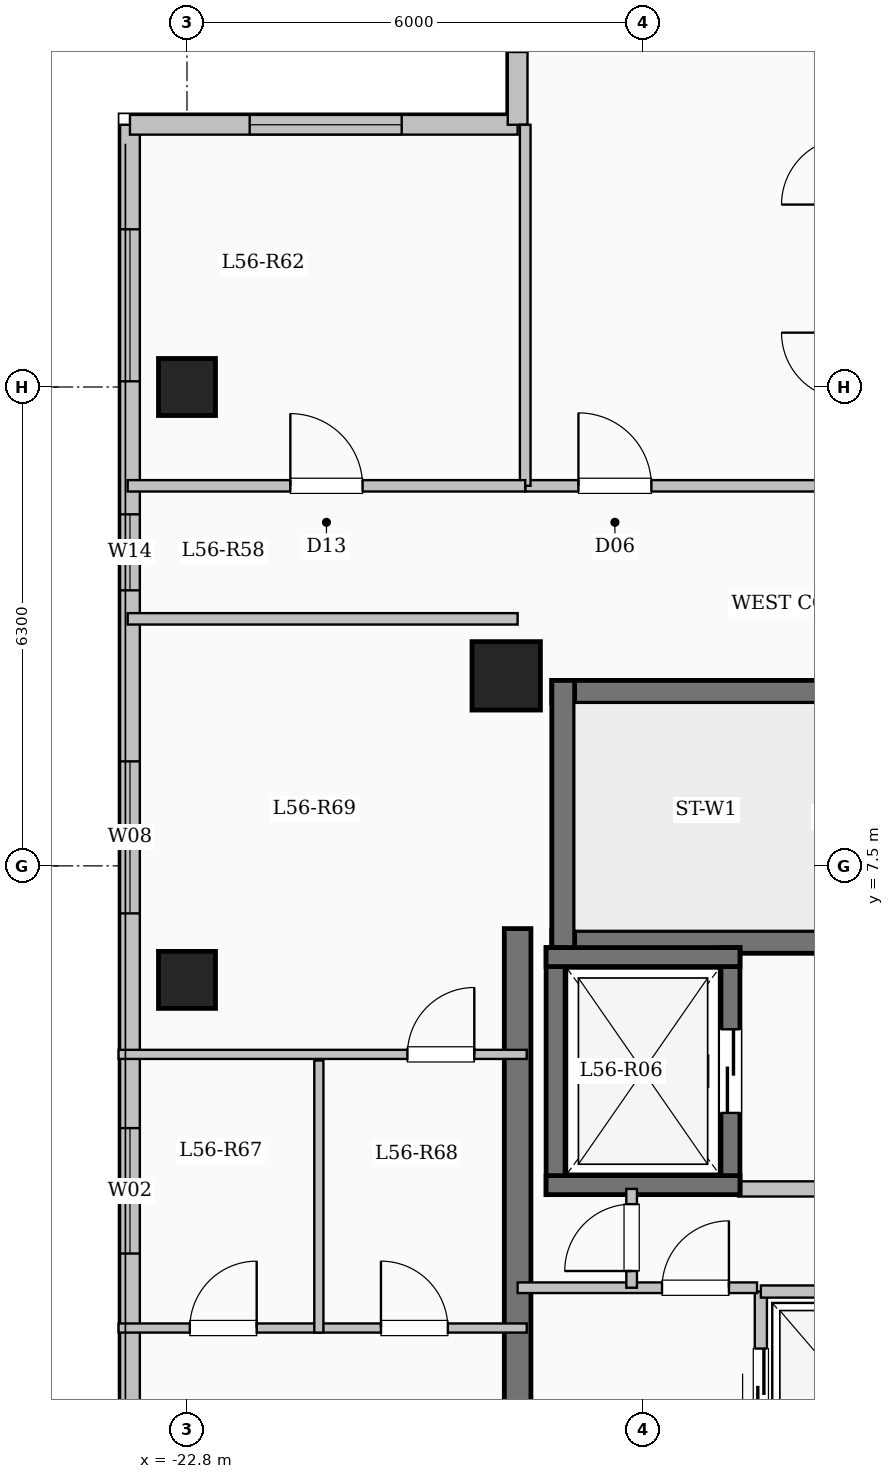
"""IFC4 building model, lengths in metres.
Left out: names, types, materials, properties, quantities, classifications, styles, units other than length and angle.
Written with IfcOpenShell. Run it as: python <this file> out.ifc"""

import sys

from ifc_helpers import new_model, si_unit, direction, frame, frame_2d, origin, origin_2d, place, context, subcontext, project, spatial, rectangle, extrude, element, fill, save


model = new_model("IFC4")
c1 = context("Model", 3, precision=1e-05, world=origin(), true_north=direction((0.0, 1.0)))
c2 = subcontext(c1, "Body", "Model", "MODEL_VIEW")
j1 = project(units=[si_unit("LENGTHUNIT", "METRE"), si_unit("PLANEANGLEUNIT", "RADIAN")], contexts=[c1])
p1 = place(None, origin())
s1 = spatial("IfcSite", under=j1, at=p1, CompositionType="ELEMENT")
p2 = place(p1, origin())
s2 = spatial("IfcBuilding", under=s1, at=p2, CompositionType="ELEMENT")
p3 = place(p2, frame((0.0, 0.0, 207.0)))
s3 = spatial("IfcBuildingStorey", under=s2, at=p3, CompositionType="ELEMENT", Elevation=207.0)
p4 = place(p3, frame((-18.6, 10.0, 0.0), z_axis=(0.0, 0.0, 1.0), x_axis=(1.0, 0.0, 0.0)))
e1 = element("IfcColumn", 1, at=p4, inside=s3, PredefinedType="COLUMN", context=c2, shape_type="SweptSolid", body=[
    extrude(rectangle(XDim=0.9, YDim=0.9, at=origin_2d()), origin(), (0.0, 0.0, 1.0), 3.35),
])
for number, where, z_axis, x_axis in (
    (2, (-22.8, 6.0, 0.0), (0.0, 0.0, 1.0), (1.0, 0.0, 0.0)),
    (3, (-22.8, 13.8, 0.0), (0.0, 0.0, 1.0), (1.0, 0.0, 0.0)),
):
    element("IfcColumn", number, at=place(p3, frame(where, z_axis=z_axis, x_axis=x_axis)), inside=s3, PredefinedType="COLUMN", context=c2, shape_type="SweptSolid", body=[
        extrude(rectangle(XDim=0.75, YDim=0.75, at=origin_2d()), origin(), (0.0, 0.0, 1.0), 3.35),
    ])
p5 = place(p3, frame((-23.55, -17.25, 0.0), z_axis=(0.0, 0.0, 1.0), x_axis=(0.0, 1.0, 0.0)))
e4 = element("IfcWall", 4, at=p5, inside=s3, PredefinedType="SOLIDWALL", context=c2, shape_type="SweptSolid", body=[
    extrude(rectangle(XDim=34.5, YDim=0.26, at=frame_2d((17.25, 0.0))), origin(), (0.0, 0.0, 1.0), 3.1),
])
p6 = place(p5, frame((2.825, 0.0, 0.9)))
e5 = element("IfcOpeningElement", 5, at=p6, cuts=e4, PredefinedType="OPENING", context=c2, shape_type="SweptSolid", body=[
    extrude(rectangle(XDim=2.2, YDim=1.75, at=frame_2d((1.1, 0.875))), frame((0.0, 0.14, 0.0), z_axis=(0.0, -1.0, 0.0), x_axis=(1.0, 0.0, 0.0)), (0.0, 0.0, 1.0), 0.28),
])
p7 = place(p5, frame((8.325, 0.0, 0.95)))
e6 = element("IfcOpeningElement", 6, at=p7, cuts=e4, PredefinedType="OPENING", context=c2, shape_type="SweptSolid", body=[
    extrude(rectangle(XDim=1.2, YDim=1.5, at=frame_2d((0.6, 0.75))), frame((0.0, 0.14, 0.0), z_axis=(0.0, -1.0, 0.0), x_axis=(1.0, 0.0, 0.0)), (0.0, 0.0, 1.0), 0.28),
])
p8 = place(p5, frame((13.25, 0.0, 0.9)))
e7 = element("IfcOpeningElement", 7, at=p8, cuts=e4, PredefinedType="OPENING", context=c2, shape_type="SweptSolid", body=[
    extrude(rectangle(XDim=2.2, YDim=1.75, at=frame_2d((1.1, 0.875))), frame((0.0, 0.14, 0.0), z_axis=(0.0, -1.0, 0.0), x_axis=(1.0, 0.0, 0.0)), (0.0, 0.0, 1.0), 0.28),
])
p9 = place(p5, frame((19.65, 0.0, 0.9)))
e8 = element("IfcOpeningElement", 8, at=p9, cuts=e4, PredefinedType="OPENING", context=c2, shape_type="SweptSolid", body=[
    extrude(rectangle(XDim=1.65, YDim=1.6, at=frame_2d((0.825, 0.8))), frame((0.0, 0.14, 0.0), z_axis=(0.0, -1.0, 0.0), x_axis=(1.0, 0.0, 0.0)), (0.0, 0.0, 1.0), 0.28),
])
p10 = place(p5, frame((24.125, 0.0, 0.9)))
e9 = element("IfcOpeningElement", 9, at=p10, cuts=e4, PredefinedType="OPENING", context=c2, shape_type="SweptSolid", body=[
    extrude(rectangle(XDim=2.0, YDim=1.7, at=frame_2d((1.0, 0.85))), frame((0.0, 0.14, 0.0), z_axis=(0.0, -1.0, 0.0), x_axis=(1.0, 0.0, 0.0)), (0.0, 0.0, 1.0), 0.28),
])
p11 = place(p5, frame((28.375, 0.0, 0.95)))
e10 = element("IfcOpeningElement", 10, at=p11, cuts=e4, PredefinedType="OPENING", context=c2, shape_type="SweptSolid", body=[
    extrude(rectangle(XDim=1.0, YDim=1.5, at=frame_2d((0.5, 0.75))), frame((0.0, 0.14, 0.0), z_axis=(0.0, -1.0, 0.0), x_axis=(1.0, 0.0, 0.0)), (0.0, 0.0, 1.0), 0.28),
])
p12 = place(p5, frame((31.125, 0.0, 0.9)))
e11 = element("IfcOpeningElement", 11, at=p12, cuts=e4, PredefinedType="OPENING", context=c2, shape_type="SweptSolid", body=[
    extrude(rectangle(XDim=2.0, YDim=1.7, at=frame_2d((1.0, 0.85))), frame((0.0, 0.14, 0.0), z_axis=(0.0, -1.0, 0.0), x_axis=(1.0, 0.0, 0.0)), (0.0, 0.0, 1.0), 0.28),
])
p13 = place(p3, frame((-23.55, 17.25, 0.0), z_axis=(0.0, 0.0, 1.0), x_axis=(1.0, 0.0, 0.0)))
e12 = element("IfcWall", 12, at=p13, inside=s3, PredefinedType="SOLIDWALL", context=c2, shape_type="SweptSolid", body=[
    extrude(rectangle(XDim=5.1, YDim=0.26, at=frame_2d((2.55, 0.0))), origin(), (0.0, 0.0, 1.0), 3.1),
])
p14 = place(p13, frame((1.575, 0.0, 0.9)))
e13 = element("IfcOpeningElement", 13, at=p14, cuts=e12, PredefinedType="OPENING", context=c2, shape_type="SweptSolid", body=[
    extrude(rectangle(XDim=2.0, YDim=1.7, at=frame_2d((1.0, 0.85))), frame((0.0, 0.14, 0.0), z_axis=(0.0, -1.0, 0.0), x_axis=(1.0, 0.0, 0.0)), (0.0, 0.0, 1.0), 0.28),
])
p15 = place(p3, frame((-18.45, 17.25, 0.0), z_axis=(0.0, 0.0, 1.0), x_axis=(0.0, 1.0, 0.0)))
e14 = element("IfcWall", 14, at=p15, inside=s3, PredefinedType="SOLIDWALL", context=c2, shape_type="SweptSolid", body=[
    extrude(rectangle(XDim=3.6, YDim=0.26, at=frame_2d((1.8, 0.0))), origin(), (0.0, 0.0, 1.0), 3.1),
])
p16 = place(p15, frame((0.958, 0.0, 0.9)))
e15 = element("IfcOpeningElement", 15, at=p16, cuts=e14, PredefinedType="OPENING", context=c2, shape_type="SweptSolid", body=[
    extrude(rectangle(XDim=1.65, YDim=1.6, at=frame_2d((0.825, 0.8))), frame((0.0, 0.14, 0.0), z_axis=(0.0, -1.0, 0.0), x_axis=(1.0, 0.0, 0.0)), (0.0, 0.0, 1.0), 0.28),
])
p17 = place(p3, frame((-18.0, 9.79, 0.0), z_axis=(0.0, 0.0, 1.0), x_axis=(1.0, 0.0, 0.0)))
e16 = element("IfcWall", 16, at=p17, inside=s3, PredefinedType="SHEAR", context=c2, shape_type="SweptSolid", body=[
    extrude(rectangle(XDim=8.0, YDim=0.3, at=frame_2d((4.0, 0.0))), origin(), (0.0, 0.0, 1.0), 3.35),
])
p18 = place(p3, frame((-18.0, 6.5, 0.0), z_axis=(0.0, 0.0, 1.0), x_axis=(1.0, 0.0, 0.0)))
e17 = element("IfcWall", 17, at=p18, inside=s3, PredefinedType="SHEAR", context=c2, shape_type="SweptSolid", body=[
    extrude(rectangle(XDim=8.0, YDim=0.3, at=frame_2d((4.0, 0.0))), origin(), (0.0, 0.0, 1.0), 3.35),
])
p19 = place(p18, frame((6.45, 0.0, 0.0)))
e18 = element("IfcOpeningElement", 18, at=p19, cuts=e17, PredefinedType="OPENING", context=c2, shape_type="SweptSolid", body=[
    extrude(rectangle(XDim=1.0, YDim=2.15, at=frame_2d((0.5, 1.075))), frame((0.0, 0.16, 0.0), z_axis=(0.0, -1.0, 0.0), x_axis=(1.0, 0.0, 0.0)), (0.0, 0.0, 1.0), 0.32),
])
p20 = place(p3, frame((-17.85, 6.35, 0.0), z_axis=(0.0, 0.0, 1.0), x_axis=(0.0, 1.0, 0.0)))
e19 = element("IfcWall", 19, at=p20, inside=s3, PredefinedType="SHEAR", context=c2, shape_type="SweptSolid", body=[
    extrude(rectangle(XDim=3.59, YDim=0.3, at=frame_2d((1.795, 0.0))), origin(), (0.0, 0.0, 1.0), 3.35),
])
p21 = place(p3, frame((-15.55, 3.25, 0.0), z_axis=(0.0, 0.0, 1.0), x_axis=(1.0, 0.0, 0.0)))
e20 = element("IfcWall", 20, at=p21, inside=s3, PredefinedType="SOLIDWALL", context=c2, shape_type="SweptSolid", body=[
    extrude(rectangle(XDim=5.4, YDim=0.2, at=frame_2d((2.7, 0.0))), origin(), (0.0, 0.0, 1.0), 3.1),
])
p22 = place(p3, frame((-17.95, 3.175, 0.0), z_axis=(0.0, 0.0, 1.0), x_axis=(0.0, 1.0, 0.0)))
e21 = element("IfcWall", 21, at=p22, inside=s3, PredefinedType="SHEAR", context=c2, shape_type="SweptSolid", body=[
    extrude(rectangle(XDim=3.25, YDim=0.25, at=frame_2d((1.625, 0.0))), origin(), (0.0, 0.0, 1.0), 3.35),
])
p23 = place(p3, frame((-15.65, 3.175, 0.0), z_axis=(0.0, 0.0, 1.0), x_axis=(0.0, 1.0, 0.0)))
e22 = element("IfcWall", 22, at=p23, inside=s3, PredefinedType="SHEAR", context=c2, shape_type="SweptSolid", body=[
    extrude(rectangle(XDim=3.25, YDim=0.25, at=frame_2d((1.625, 0.0))), origin(), (0.0, 0.0, 1.0), 3.35),
])
p24 = place(p23, frame((1.075, 0.0, 0.0)))
e23 = element("IfcOpeningElement", 23, at=p24, cuts=e22, PredefinedType="OPENING", context=c2, shape_type="SweptSolid", body=[
    extrude(rectangle(XDim=1.1, YDim=2.15, at=frame_2d((0.55, 1.075))), frame((0.0, 0.135, 0.0), z_axis=(0.0, -1.0, 0.0), x_axis=(1.0, 0.0, 0.0)), (0.0, 0.0, 1.0), 0.27),
])
for number, where, z_axis, x_axis in (
    (24, (-18.075, 3.3, 0.0), (0.0, 0.0, 1.0), (1.0, 0.0, 0.0)),
    (25, (-18.075, 6.3, 0.0), (0.0, 0.0, 1.0), (1.0, 0.0, 0.0)),
):
    element("IfcWall", number, at=place(p3, frame(where, z_axis=z_axis, x_axis=x_axis)), inside=s3, PredefinedType="SHEAR", context=c2, shape_type="SweptSolid", body=[
        extrude(rectangle(XDim=2.55, YDim=0.25, at=frame_2d((1.275, 0.0))), origin(), (0.0, 0.0, 1.0), 3.35),
    ])
p25 = place(p3, frame((-15.25, -0.7, 0.0), z_axis=(0.0, 0.0, 1.0), x_axis=(0.0, 1.0, 0.0)))
e26 = element("IfcWall", 26, at=p25, inside=s3, PredefinedType="SOLIDWALL", context=c2, shape_type="SweptSolid", body=[
    extrude(rectangle(XDim=2.6, YDim=0.16, at=frame_2d((1.3, 0.0))), origin(), (0.0, 0.0, 1.0), 3.1),
])
p26 = place(p25, frame((0.75, 0.0, 0.0)))
e27 = element("IfcOpeningElement", 27, at=p26, cuts=e26, PredefinedType="OPENING", context=c2, shape_type="SweptSolid", body=[
    extrude(rectangle(XDim=1.1, YDim=2.15, at=frame_2d((0.55, 1.075))), frame((0.0, 0.09, 0.0), z_axis=(0.0, -1.0, 0.0), x_axis=(1.0, 0.0, 0.0)), (0.0, 0.0, 1.0), 0.18),
])
p27 = place(p3, frame((-15.25, 1.9, 0.0), z_axis=(0.0, 0.0, 1.0), x_axis=(1.0, 0.0, 0.0)))
e28 = element("IfcWall", 28, at=p27, inside=s3, PredefinedType="SOLIDWALL", context=c2, shape_type="SweptSolid", body=[
    extrude(rectangle(XDim=2.3, YDim=0.16, at=frame_2d((1.15, 0.0))), origin(), (0.0, 0.0, 1.0), 3.1),
])
p28 = place(p3, frame((-18.45, -7.375, 0.0), z_axis=(0.0, 0.0, 1.0), x_axis=(0.0, 1.0, 0.0)))
e29 = element("IfcWall", 29, at=p28, inside=s3, PredefinedType="SHEAR", context=c2, shape_type="SweptSolid", body=[
    extrude(rectangle(XDim=14.05, YDim=0.35, at=frame_2d((7.025, 0.0))), origin(), (0.0, 0.0, 1.0), 3.35),
])
p29 = place(p3, frame((-18.45, 1.95, 0.0), z_axis=(0.0, 0.0, 1.0), x_axis=(1.0, 0.0, 0.0)))
e30 = element("IfcWall", 30, at=p29, inside=s3, PredefinedType="PARTITIONING", context=c2, shape_type="SweptSolid", body=[
    extrude(rectangle(XDim=3.15, YDim=0.14, at=frame_2d((1.575, 0.0))), origin(), (0.0, 0.0, 1.0), 3.1),
])
p30 = place(p29, frame((1.9, 0.0, 0.0)))
e31 = element("IfcOpeningElement", 31, at=p30, cuts=e30, PredefinedType="OPENING", context=c2, shape_type="SweptSolid", body=[
    extrude(rectangle(XDim=0.88, YDim=2.1, at=frame_2d((0.44, 1.05))), frame((0.0, 0.08, 0.0), z_axis=(0.0, -1.0, 0.0), x_axis=(1.0, 0.0, 0.0)), (0.0, 0.0, 1.0), 0.16),
])
p31 = place(p3, frame((-16.95, 1.95, 0.0), z_axis=(0.0, 0.0, 1.0), x_axis=(0.0, 1.0, 0.0)))
e32 = element("IfcWall", 32, at=p31, inside=s3, PredefinedType="PARTITIONING", context=c2, shape_type="SweptSolid", body=[
    extrude(rectangle(XDim=1.3, YDim=0.14, at=frame_2d((0.65, 0.0))), origin(), (0.0, 0.0, 1.0), 3.1),
])
p32 = place(p31, frame((0.22, 0.0, 0.0)))
e33 = element("IfcOpeningElement", 33, at=p32, cuts=e32, PredefinedType="OPENING", context=c2, shape_type="SweptSolid", body=[
    extrude(rectangle(XDim=0.88, YDim=2.1, at=frame_2d((0.44, 1.05))), frame((0.0, 0.08, 0.0), z_axis=(0.0, -1.0, 0.0), x_axis=(1.0, 0.0, 0.0)), (0.0, 0.0, 1.0), 0.16),
])
p33 = place(p3, frame((-18.35, 12.5, 0.0), z_axis=(0.0, 0.0, 1.0), x_axis=(1.0, 0.0, 0.0)))
e34 = element("IfcWall", 34, at=p33, inside=s3, PredefinedType="PARTITIONING", context=c2, shape_type="SweptSolid", body=[
    extrude(rectangle(XDim=14.5, YDim=0.15, at=frame_2d((7.25, 0.0))), origin(), (0.0, 0.0, 1.0), 3.1),
])
p34 = place(p33, frame((0.7, 0.0, 0.0)))
e35 = element("IfcOpeningElement", 35, at=p34, cuts=e34, PredefinedType="OPENING", context=c2, shape_type="SweptSolid", body=[
    extrude(rectangle(XDim=0.96, YDim=2.15, at=frame_2d((0.48, 1.075))), frame((0.0, 0.085, 0.0), z_axis=(0.0, -1.0, 0.0), x_axis=(1.0, 0.0, 0.0)), (0.0, 0.0, 1.0), 0.17),
])
p35 = place(p33, frame((9.205, 0.0, 0.0)))
e36 = element("IfcOpeningElement", 36, at=p35, cuts=e34, PredefinedType="OPENING", context=c2, shape_type="SweptSolid", body=[
    extrude(rectangle(XDim=0.96, YDim=2.15, at=frame_2d((0.48, 1.075))), frame((0.0, 0.085, 0.0), z_axis=(0.0, -1.0, 0.0), x_axis=(1.0, 0.0, 0.0)), (0.0, 0.0, 1.0), 0.17),
])
p36 = place(p3, frame((-23.58, 10.75, 0.0), z_axis=(0.0, 0.0, 1.0), x_axis=(1.0, 0.0, 0.0)))
e37 = element("IfcWall", 37, at=p36, inside=s3, PredefinedType="PARTITIONING", context=c2, shape_type="SweptSolid", body=[
    extrude(rectangle(XDim=5.13, YDim=0.15, at=frame_2d((2.565, 0.0))), origin(), (0.0, 0.0, 1.0), 3.1),
])
p37 = place(p3, frame((-18.35, 12.5, 0.0), z_axis=(0.0, 0.0, 1.0), x_axis=(0.0, 1.0, 0.0)))
e38 = element("IfcWall", 38, at=p37, inside=s3, PredefinedType="PARTITIONING", context=c2, shape_type="SweptSolid", body=[
    extrude(rectangle(XDim=4.75, YDim=0.14, at=frame_2d((2.375, 0.0))), origin(), (0.0, 0.0, 1.0), 3.1),
])
p38 = place(p3, frame((-23.58, 12.5, 0.0), z_axis=(0.0, 0.0, 1.0), x_axis=(1.0, 0.0, 0.0)))
e39 = element("IfcWall", 39, at=p38, inside=s3, PredefinedType="PARTITIONING", context=c2, shape_type="SweptSolid", body=[
    extrude(rectangle(XDim=5.23, YDim=0.15, at=frame_2d((2.615, 0.0))), origin(), (0.0, 0.0, 1.0), 3.1),
])
p39 = place(p38, frame((2.14, 0.0, 0.0)))
e40 = element("IfcOpeningElement", 40, at=p39, cuts=e39, PredefinedType="OPENING", context=c2, shape_type="SweptSolid", body=[
    extrude(rectangle(XDim=0.95, YDim=2.15, at=frame_2d((0.475, 1.075))), frame((0.0, 0.085, 0.0), z_axis=(0.0, -1.0, 0.0), x_axis=(1.0, 0.0, 0.0)), (0.0, 0.0, 1.0), 0.17),
])
p40 = place(p3, frame((-23.7, 1.42, 0.0), z_axis=(0.0, 0.0, 1.0), x_axis=(1.0, 0.0, 0.0)))
e41 = element("IfcWall", 41, at=p40, inside=s3, PredefinedType="PARTITIONING", context=c2, shape_type="SweptSolid", body=[
    extrude(rectangle(XDim=5.37, YDim=0.12, at=frame_2d((2.685, 0.0))), origin(), (0.0, 0.0, 1.0), 3.1),
])
p41 = place(p40, frame((0.937, 0.0, 0.0)))
e42 = element("IfcOpeningElement", 42, at=p41, cuts=e41, PredefinedType="OPENING", context=c2, shape_type="SweptSolid", body=[
    extrude(rectangle(XDim=0.88, YDim=2.1, at=frame_2d((0.44, 1.05))), frame((0.0, 0.07, 0.0), z_axis=(0.0, -1.0, 0.0), x_axis=(1.0, 0.0, 0.0)), (0.0, 0.0, 1.0), 0.14),
])
p42 = place(p40, frame((3.452, 0.0, 0.0)))
e43 = element("IfcOpeningElement", 43, at=p42, cuts=e41, PredefinedType="OPENING", context=c2, shape_type="SweptSolid", body=[
    extrude(rectangle(XDim=0.88, YDim=2.1, at=frame_2d((0.44, 1.05))), frame((0.0, 0.07, 0.0), z_axis=(0.0, -1.0, 0.0), x_axis=(1.0, 0.0, 0.0)), (0.0, 0.0, 1.0), 0.14),
])
p43 = place(p3, frame((-23.7, 5.02, 0.0), z_axis=(0.0, 0.0, 1.0), x_axis=(1.0, 0.0, 0.0)))
e44 = element("IfcWall", 44, at=p43, inside=s3, PredefinedType="PARTITIONING", context=c2, shape_type="SweptSolid", body=[
    extrude(rectangle(XDim=5.37, YDim=0.12, at=frame_2d((2.685, 0.0))), origin(), (0.0, 0.0, 1.0), 3.1),
])
p44 = place(p43, frame((3.8, 0.0, 0.0)))
e45 = element("IfcOpeningElement", 45, at=p44, cuts=e44, PredefinedType="OPENING", context=c2, shape_type="SweptSolid", body=[
    extrude(rectangle(XDim=0.88, YDim=2.1, at=frame_2d((0.44, 1.05))), frame((0.0, 0.07, 0.0), z_axis=(0.0, -1.0, 0.0), x_axis=(1.0, 0.0, 0.0)), (0.0, 0.0, 1.0), 0.14),
])
p45 = place(p3, frame((-21.065, 1.36, 0.0), z_axis=(0.0, 0.0, 1.0), x_axis=(0.0, 1.0, 0.0)))
e46 = element("IfcWall", 46, at=p45, inside=s3, PredefinedType="PARTITIONING", context=c2, shape_type="SweptSolid", body=[
    extrude(rectangle(XDim=3.58, YDim=0.12, at=frame_2d((1.79, 0.0))), origin(), (0.0, 0.0, 1.0), 3.1),
])
p46 = place(p9, origin())
e47 = element("IfcWindow", 47, at=p46, inside=s3, PartitioningType="SINGLE_PANEL", PredefinedType="WINDOW", context=c2, shape_type="SweptSolid", body=[
    extrude(rectangle(XDim=1.65, YDim=1.6, at=frame_2d((0.825, 0.8))), frame((0.0, 0.03, 0.0), z_axis=(0.0, -1.0, 0.0), x_axis=(1.0, 0.0, 0.0)), (0.0, 0.0, 1.0), 0.06),
])
fill(e8, e47)
p47 = place(p10, origin())
e48 = element("IfcWindow", 48, at=p47, inside=s3, PartitioningType="SINGLE_PANEL", PredefinedType="WINDOW", context=c2, shape_type="SweptSolid", body=[
    extrude(rectangle(XDim=2.0, YDim=1.7, at=frame_2d((1.0, 0.85))), frame((0.0, 0.03, 0.0), z_axis=(0.0, -1.0, 0.0), x_axis=(1.0, 0.0, 0.0)), (0.0, 0.0, 1.0), 0.06),
])
fill(e9, e48)
p48 = place(p11, origin())
e49 = element("IfcWindow", 49, at=p48, inside=s3, PartitioningType="SINGLE_PANEL", PredefinedType="WINDOW", context=c2, shape_type="SweptSolid", body=[
    extrude(rectangle(XDim=1.0, YDim=1.5, at=frame_2d((0.5, 0.75))), frame((0.0, 0.03, 0.0), z_axis=(0.0, -1.0, 0.0), x_axis=(1.0, 0.0, 0.0)), (0.0, 0.0, 1.0), 0.06),
])
fill(e10, e49)
p49 = place(p12, origin())
e50 = element("IfcWindow", 50, at=p49, inside=s3, PartitioningType="SINGLE_PANEL", PredefinedType="WINDOW", context=c2, shape_type="SweptSolid", body=[
    extrude(rectangle(XDim=2.0, YDim=1.7, at=frame_2d((1.0, 0.85))), frame((0.0, 0.03, 0.0), z_axis=(0.0, -1.0, 0.0), x_axis=(1.0, 0.0, 0.0)), (0.0, 0.0, 1.0), 0.06),
])
fill(e11, e50)
p50 = place(p14, origin())
e51 = element("IfcWindow", 51, at=p50, inside=s3, PartitioningType="SINGLE_PANEL", PredefinedType="WINDOW", context=c2, shape_type="SweptSolid", body=[
    extrude(rectangle(XDim=2.0, YDim=1.7, at=frame_2d((1.0, 0.85))), frame((0.0, 0.03, 0.0), z_axis=(0.0, -1.0, 0.0), x_axis=(1.0, 0.0, 0.0)), (0.0, 0.0, 1.0), 0.06),
])
fill(e13, e51)
p51 = place(p24, origin())
e52 = element("IfcDoor", 52, at=p51, inside=s3, OperationType="SLIDING_TO_LEFT", PredefinedType="DOOR", context=c2, shape_type="SweptSolid", body=[
    extrude(rectangle(XDim=1.1, YDim=2.15, at=frame_2d((0.55, 1.075))), frame((0.0, 0.025, 0.0), z_axis=(0.0, -1.0, 0.0), x_axis=(1.0, 0.0, 0.0)), (0.0, 0.0, 1.0), 0.05),
])
fill(e23, e52)
p52 = place(p26, origin())
e53 = element("IfcDoor", 53, at=p52, inside=s3, OperationType="SLIDING_TO_LEFT", PredefinedType="DOOR", context=c2, shape_type="SweptSolid", body=[
    extrude(rectangle(XDim=1.1, YDim=2.15, at=frame_2d((0.55, 1.075))), frame((0.0, 0.025, 0.0), z_axis=(0.0, -1.0, 0.0), x_axis=(1.0, 0.0, 0.0)), (0.0, 0.0, 1.0), 0.05),
])
fill(e27, e53)
p53 = place(p30, origin())
e54 = element("IfcDoor", 54, at=p53, inside=s3, OperationType="SINGLE_SWING_RIGHT", PredefinedType="DOOR", context=c2, shape_type="SweptSolid", body=[
    extrude(rectangle(XDim=0.88, YDim=2.1, at=frame_2d((0.44, 1.05))), frame((0.0, 0.025, 0.0), z_axis=(0.0, -1.0, 0.0), x_axis=(1.0, 0.0, 0.0)), (0.0, 0.0, 1.0), 0.05),
])
fill(e31, e54)
p54 = place(p32, origin())
e55 = element("IfcDoor", 55, at=p54, inside=s3, OperationType="SINGLE_SWING_LEFT", PredefinedType="DOOR", context=c2, shape_type="SweptSolid", body=[
    extrude(rectangle(XDim=0.88, YDim=2.1, at=frame_2d((0.44, 1.05))), frame((0.0, 0.025, 0.0), z_axis=(0.0, -1.0, 0.0), x_axis=(1.0, 0.0, 0.0)), (0.0, 0.0, 1.0), 0.05),
])
fill(e33, e55)
p55 = place(p34, origin())
e56 = element("IfcDoor", 56, at=p55, inside=s3, OperationType="SINGLE_SWING_LEFT", PredefinedType="DOOR", context=c2, shape_type="SweptSolid", body=[
    extrude(rectangle(XDim=0.96, YDim=2.15, at=frame_2d((0.48, 1.075))), frame((0.0, 0.025, 0.0), z_axis=(0.0, -1.0, 0.0), x_axis=(1.0, 0.0, 0.0)), (0.0, 0.0, 1.0), 0.05),
])
fill(e35, e56)
p56 = place(p39, origin())
e57 = element("IfcDoor", 57, at=p56, inside=s3, OperationType="SINGLE_SWING_LEFT", PredefinedType="DOOR", context=c2, shape_type="SweptSolid", body=[
    extrude(rectangle(XDim=0.95, YDim=2.15, at=frame_2d((0.475, 1.075))), frame((0.0, 0.025, 0.0), z_axis=(0.0, -1.0, 0.0), x_axis=(1.0, 0.0, 0.0)), (0.0, 0.0, 1.0), 0.05),
])
fill(e40, e57)
p57 = place(p41, origin())
e58 = element("IfcDoor", 58, at=p57, inside=s3, OperationType="SINGLE_SWING_RIGHT", PredefinedType="DOOR", context=c2, shape_type="SweptSolid", body=[
    extrude(rectangle(XDim=0.88, YDim=2.1, at=frame_2d((0.44, 1.05))), frame((0.0, 0.025, 0.0), z_axis=(0.0, -1.0, 0.0), x_axis=(1.0, 0.0, 0.0)), (0.0, 0.0, 1.0), 0.05),
])
fill(e42, e58)
p58 = place(p42, origin())
e59 = element("IfcDoor", 59, at=p58, inside=s3, OperationType="SINGLE_SWING_LEFT", PredefinedType="DOOR", context=c2, shape_type="SweptSolid", body=[
    extrude(rectangle(XDim=0.88, YDim=2.1, at=frame_2d((0.44, 1.05))), frame((0.0, 0.025, 0.0), z_axis=(0.0, -1.0, 0.0), x_axis=(1.0, 0.0, 0.0)), (0.0, 0.0, 1.0), 0.05),
])
fill(e43, e59)
p59 = place(p44, origin())
e60 = element("IfcDoor", 60, at=p59, inside=s3, OperationType="SINGLE_SWING_RIGHT", PredefinedType="DOOR", context=c2, shape_type="SweptSolid", body=[
    extrude(rectangle(XDim=0.88, YDim=2.1, at=frame_2d((0.44, 1.05))), frame((0.0, 0.025, 0.0), z_axis=(0.0, -1.0, 0.0), x_axis=(1.0, 0.0, 0.0)), (0.0, 0.0, 1.0), 0.05),
])
fill(e45, e60)
save(model, sys.argv[1])
